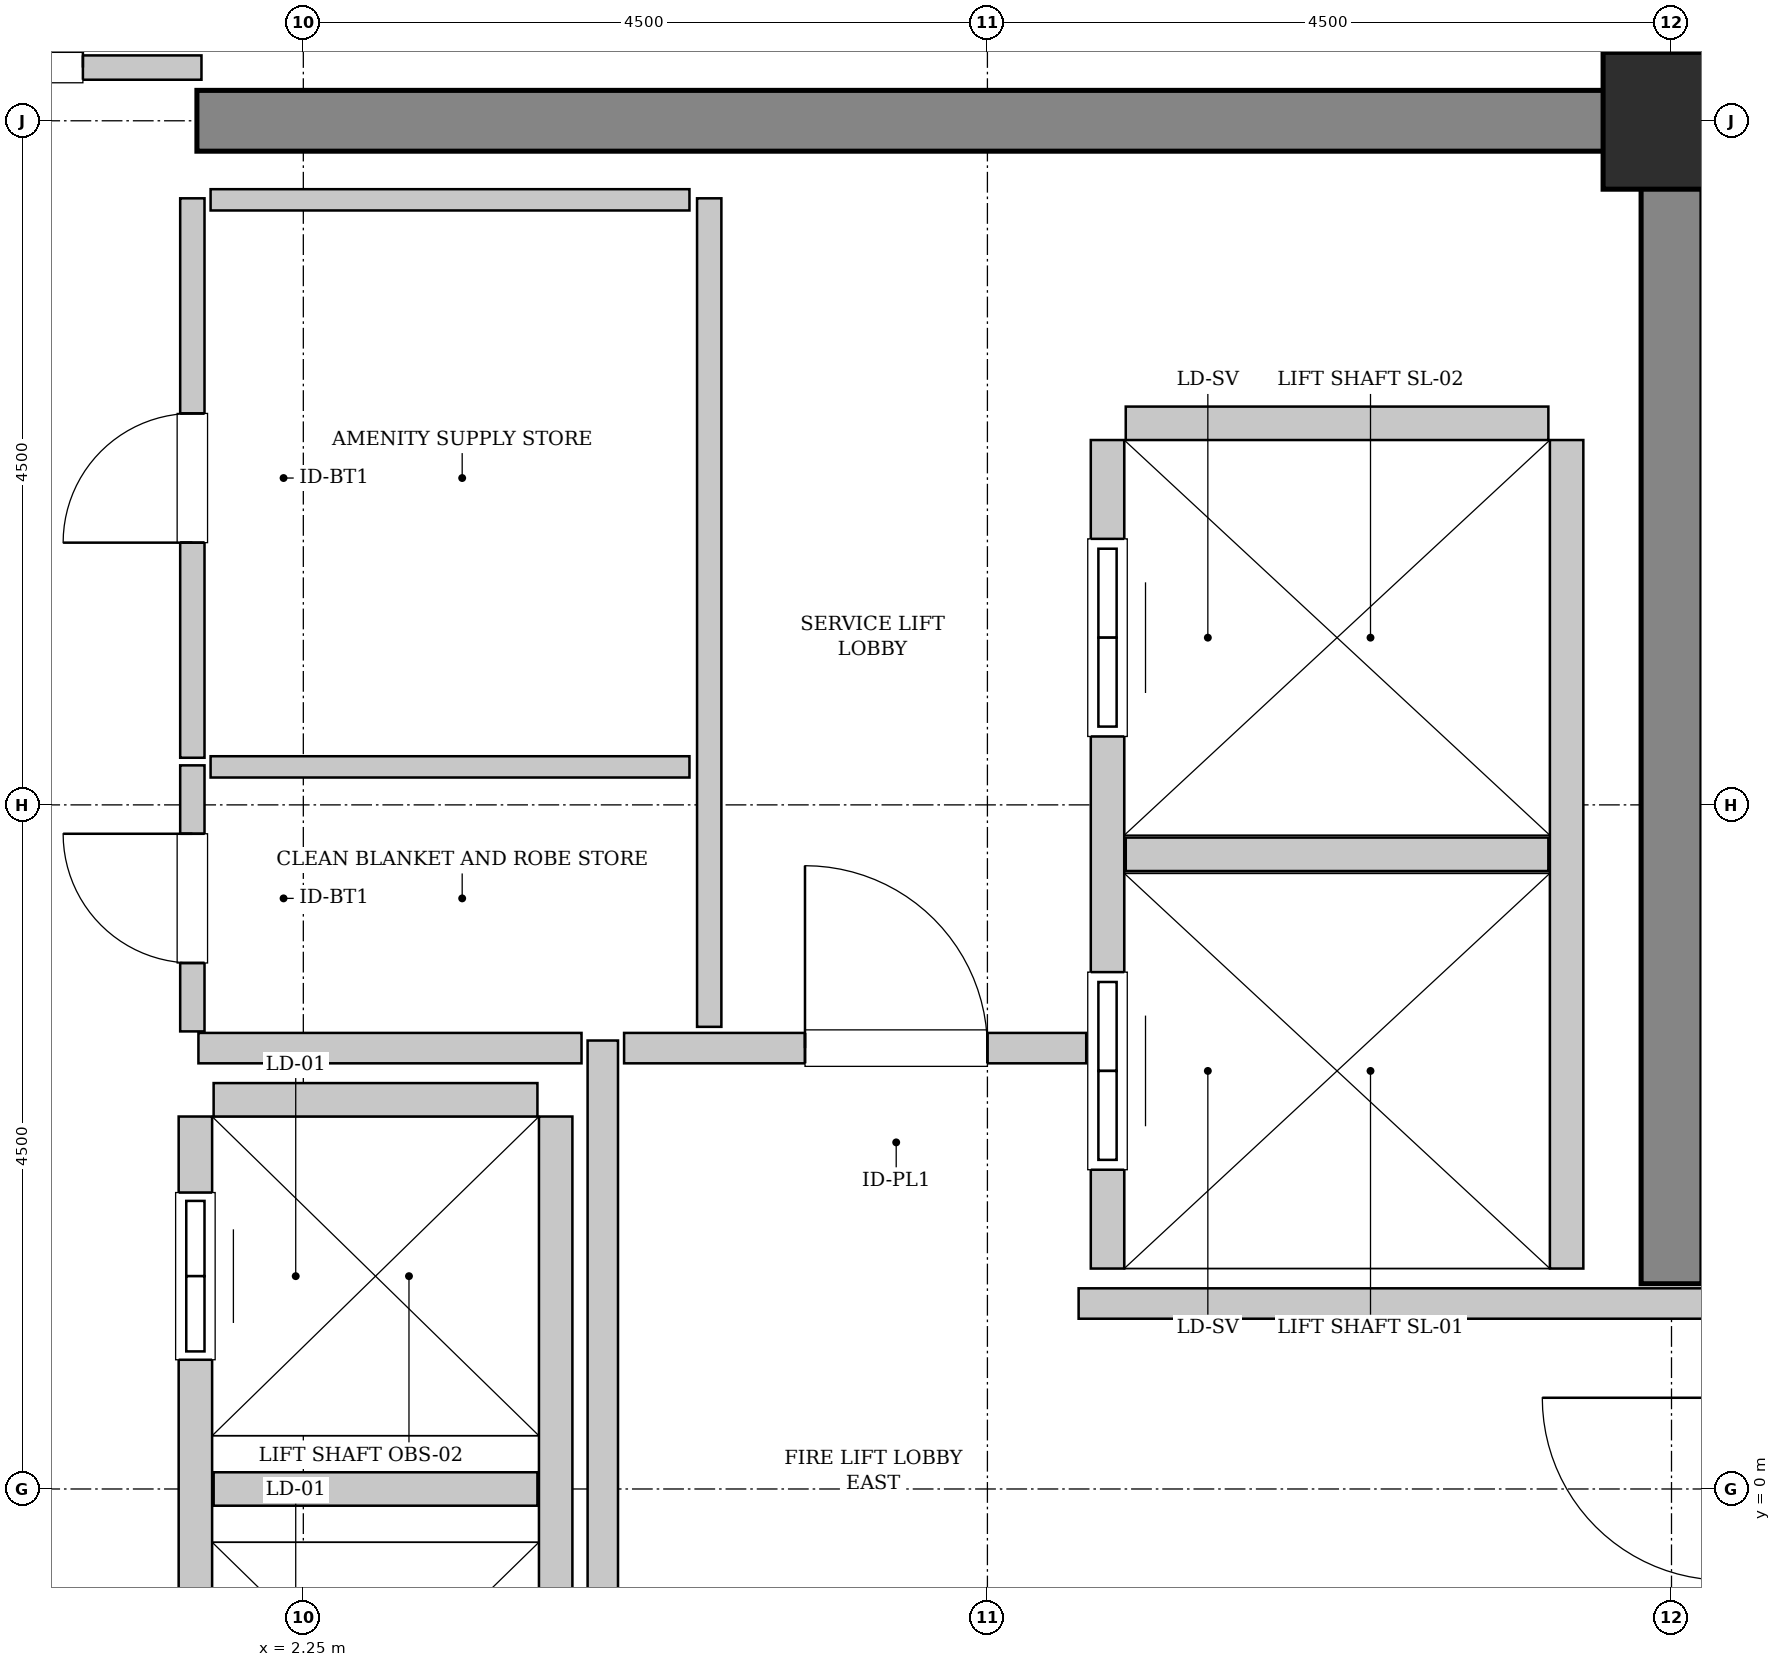
"""IFC4 building model, lengths in metres.
Left out: names, types, materials, properties, quantities, classifications, styles, units other than length and angle.
Written with IfcOpenShell. Run it as: python <this file> out.ifc"""

import sys

from ifc_helpers import new_model, si_unit, direction, frame, frame_2d, origin, origin_2d, place, context, subcontext, project, spatial, rectangle, extrude, source, transform, mapped, element, fill, save


model = new_model("IFC4")
c1 = context("Model", 3, precision=1e-05, world=origin(), true_north=direction((0.0, 1.0)))
c2 = subcontext(c1, "Body", "Model", "MODEL_VIEW")
j1 = project(units=[si_unit("LENGTHUNIT", "METRE"), si_unit("PLANEANGLEUNIT", "RADIAN")], contexts=[c1])
p1 = place(None, origin())
s1 = spatial("IfcSite", under=j1, at=p1, CompositionType="ELEMENT")
p2 = place(p1, origin())
s2 = spatial("IfcBuilding", under=s1, at=p2, CompositionType="ELEMENT")
p3 = place(p2, frame((0.0, 0.0, 349.0)))
s3 = spatial("IfcBuildingStorey", under=s2, at=p3, CompositionType="ELEMENT", Elevation=349.0)
m1 = source(origin(), c2, "Body", "SweptSolid", [
    extrude(rectangle(XDim=9.9, YDim=0.4, at=frame_2d((4.95, 0.0))), origin(), (0.0, 0.0, 1.0), 4.8),
])
p4 = place(p3, frame((1.55, 9.0, 0.0), z_axis=(0.0, 0.0, 1.0), x_axis=(1.0, 0.0, 0.0)))
e1 = element("IfcWall", 1, at=p4, inside=s3, PredefinedType="SHEAR", context=c2, shape_type="MappedRepresentation", body=[
    mapped(m1, transform((0.0, 0.0, 0.0), x_axis=(1.0, 0.0, 0.0), y_axis=(0.0, 1.0, 0.0), z_axis=(0.0, 0.0, 1.0), scale=1.0)),
])
m2 = source(origin(), c2, "Body", "SweptSolid", [
    extrude(rectangle(XDim=7.45, YDim=0.4, at=frame_2d((3.725, 0.0))), origin(), (0.0, 0.0, 1.0), 4.8),
])
p5 = place(p3, frame((11.25, 1.35, 0.0), z_axis=(0.0, 0.0, 1.0), x_axis=(0.0, 1.0, 0.0)))
e2 = element("IfcWall", 2, at=p5, inside=s3, PredefinedType="SHEAR", context=c2, shape_type="MappedRepresentation", body=[
    mapped(m2, transform((0.0, 0.0, 0.0), x_axis=(1.0, 0.0, 0.0), y_axis=(0.0, 1.0, 0.0), z_axis=(0.0, 0.0, 1.0), scale=1.0)),
])
m3 = source(origin(), c2, "Body", "SweptSolid", [
    extrude(rectangle(XDim=0.9, YDim=0.9, at=origin_2d()), origin(), (0.0, 0.0, 1.0), 4.8),
])
p6 = place(p3, frame((11.25, 9.0, 0.0), z_axis=(0.0, 0.0, 1.0), x_axis=(1.0, 0.0, 0.0)))
e3 = element("IfcColumn", 3, at=p6, inside=s3, PredefinedType="COLUMN", context=c2, shape_type="MappedRepresentation", body=[
    mapped(m3, transform((0.0, 0.0, 0.0), x_axis=(1.0, 0.0, 0.0), y_axis=(0.0, 1.0, 0.0), z_axis=(0.0, 0.0, 1.0), scale=1.0)),
])
m4 = source(origin(), c2, "Body", "SweptSolid", [
    extrude(rectangle(XDim=5.45, YDim=0.22, at=frame_2d((2.725, 0.0))), origin(), (0.0, 0.0, 1.0), 4.485),
])
p7 = place(p3, frame((7.54, 6.9, 0.0), z_axis=(0.0, 0.0, 1.0), x_axis=(0.0, -1.0, 0.0)))
e4 = element("IfcWall", 4, at=p7, inside=s3, PredefinedType="SOLIDWALL", context=c2, shape_type="MappedRepresentation", body=[
    mapped(m4, transform((0.0, 0.0, 0.0), x_axis=(1.0, 0.0, 0.0), y_axis=(0.0, 1.0, 0.0), z_axis=(0.0, 0.0, 1.0), scale=1.0)),
])
p8 = place(p7, frame((3.5, 0.0, 0.0)))
e5 = element("IfcOpeningElement", 5, at=p8, cuts=e4, PredefinedType="OPENING", context=c2, shape_type="SweptSolid", body=[
    extrude(rectangle(XDim=1.3, YDim=2.3, at=frame_2d((0.65, 1.15))), frame((0.0, 0.12, 0.0), z_axis=(0.0, -1.0, 0.0), x_axis=(1.0, 0.0, 0.0)), (0.0, 0.0, 1.0), 0.24),
])
p9 = place(p7, frame((0.65, 0.0, 0.0)))
e6 = element("IfcOpeningElement", 6, at=p9, cuts=e4, PredefinedType="OPENING", context=c2, shape_type="SweptSolid", body=[
    extrude(rectangle(XDim=1.3, YDim=2.3, at=frame_2d((0.65, 1.15))), frame((0.0, 0.12, 0.0), z_axis=(0.0, -1.0, 0.0), x_axis=(1.0, 0.0, 0.0)), (0.0, 0.0, 1.0), 0.24),
])
p10 = place(p3, frame((10.56, 1.45, 0.0), z_axis=(0.0, 0.0, 1.0), x_axis=(0.0, 1.0, 0.0)))
e7 = element("IfcWall", 7, at=p10, inside=s3, PredefinedType="SOLIDWALL", context=c2, shape_type="MappedRepresentation", body=[
    mapped(m4, transform((0.0, 0.0, 0.0), x_axis=(1.0, 0.0, 0.0), y_axis=(0.0, 1.0, 0.0), z_axis=(0.0, 0.0, 1.0), scale=1.0)),
])
m5 = source(origin(), c2, "Body", "SweptSolid", [
    extrude(rectangle(XDim=2.78, YDim=0.22, at=frame_2d((1.39, 0.0))), origin(), (0.0, 0.0, 1.0), 4.485),
])
for number, where, z_axis, x_axis in (
    (8, (7.66, 4.175, 0.0), (0.0, 0.0, 1.0), (1.0, 0.0, 0.0)),
    (9, (10.44, 7.01, 0.0), (0.0, 0.0, 1.0), (-1.0, 0.0, 0.0)),
):
    element("IfcWall", number, at=place(p3, frame(where, z_axis=z_axis, x_axis=x_axis)), inside=s3, PredefinedType="SOLIDWALL", context=c2, shape_type="MappedRepresentation", body=[
        mapped(m5, transform((0.0, 0.0, 0.0), x_axis=(1.0, 0.0, 0.0), y_axis=(0.0, 1.0, 0.0), z_axis=(0.0, 0.0, 1.0), scale=1.0)),
    ])
m6 = source(origin(), c2, "Body", "SweptSolid", [
    extrude(rectangle(XDim=4.9, YDim=0.22, at=frame_2d((2.45, 0.0))), origin(), (0.0, 0.0, 1.0), 4.485),
])
p11 = place(p3, frame((1.54, 2.45, 0.0), z_axis=(0.0, 0.0, 1.0), x_axis=(0.0, -1.0, 0.0)))
e10 = element("IfcWall", 10, at=p11, inside=s3, PredefinedType="SOLIDWALL", context=c2, shape_type="MappedRepresentation", body=[
    mapped(m6, transform((0.0, 0.0, 0.0), x_axis=(1.0, 0.0, 0.0), y_axis=(0.0, 1.0, 0.0), z_axis=(0.0, 0.0, 1.0), scale=1.0)),
])
p12 = place(p11, frame((3.3, 0.0, 0.0)))
e11 = element("IfcOpeningElement", 11, at=p12, cuts=e10, PredefinedType="OPENING", context=c2, shape_type="SweptSolid", body=[
    extrude(rectangle(XDim=1.1, YDim=2.2, at=frame_2d((0.55, 1.1))), frame((0.0, 0.12, 0.0), z_axis=(0.0, -1.0, 0.0), x_axis=(1.0, 0.0, 0.0)), (0.0, 0.0, 1.0), 0.24),
])
p13 = place(p11, frame((0.5, 0.0, 0.0)))
e12 = element("IfcOpeningElement", 12, at=p13, cuts=e10, PredefinedType="OPENING", context=c2, shape_type="SweptSolid", body=[
    extrude(rectangle(XDim=1.1, YDim=2.2, at=frame_2d((0.55, 1.1))), frame((0.0, 0.12, 0.0), z_axis=(0.0, -1.0, 0.0), x_axis=(1.0, 0.0, 0.0)), (0.0, 0.0, 1.0), 0.24),
])
p14 = place(p3, frame((3.91, -2.45, 0.0), z_axis=(0.0, 0.0, 1.0), x_axis=(0.0, 1.0, 0.0)))
e13 = element("IfcWall", 13, at=p14, inside=s3, PredefinedType="SOLIDWALL", context=c2, shape_type="MappedRepresentation", body=[
    mapped(m6, transform((0.0, 0.0, 0.0), x_axis=(1.0, 0.0, 0.0), y_axis=(0.0, 1.0, 0.0), z_axis=(0.0, 0.0, 1.0), scale=1.0)),
])
m7 = source(origin(), c2, "Body", "SweptSolid", [
    extrude(rectangle(XDim=2.13, YDim=0.22, at=frame_2d((1.065, 0.0))), origin(), (0.0, 0.0, 1.0), 4.485),
])
for number, where, z_axis, x_axis in (
    (14, (1.66, 0.0, 0.0), (0.0, 0.0, 1.0), (1.0, 0.0, 0.0)),
    (15, (3.79, 2.56, 0.0), (0.0, 0.0, 1.0), (-1.0, 0.0, 0.0)),
):
    element("IfcWall", number, at=place(p3, frame(where, z_axis=z_axis, x_axis=x_axis)), inside=s3, PredefinedType="SOLIDWALL", context=c2, shape_type="MappedRepresentation", body=[
        mapped(m7, transform((0.0, 0.0, 0.0), x_axis=(1.0, 0.0, 0.0), y_axis=(0.0, 1.0, 0.0), z_axis=(0.0, 0.0, 1.0), scale=1.0)),
    ])
m8 = source(origin(), c2, "Body", "SweptSolid", [
    extrude(rectangle(XDim=5.9, YDim=0.2, at=frame_2d((2.95, 0.0))), origin(), (0.0, 0.0, 1.0), 4.485),
])
p15 = place(p3, frame((4.22, -2.95, 0.0), z_axis=(0.0, 0.0, 1.0), x_axis=(0.0, 1.0, 0.0)))
e16 = element("IfcWall", 16, at=p15, inside=s3, PredefinedType="PARTITIONING", context=c2, shape_type="MappedRepresentation", body=[
    mapped(m8, transform((0.0, 0.0, 0.0), x_axis=(1.0, 0.0, 0.0), y_axis=(0.0, 1.0, 0.0), z_axis=(0.0, 0.0, 1.0), scale=1.0)),
])
m9 = source(origin(), c2, "Body", "SweptSolid", [
    extrude(rectangle(XDim=2.52, YDim=0.2, at=frame_2d((1.26, 0.0))), origin(), (0.0, 0.0, 1.0), 4.485),
])
p16 = place(p3, frame((1.56, 2.9, 0.0), z_axis=(0.0, 0.0, 1.0), x_axis=(1.0, 0.0, 0.0)))
e17 = element("IfcWall", 17, at=p16, inside=s3, PredefinedType="PARTITIONING", context=c2, shape_type="MappedRepresentation", body=[
    mapped(m9, transform((0.0, 0.0, 0.0), x_axis=(1.0, 0.0, 0.0), y_axis=(0.0, 1.0, 0.0), z_axis=(0.0, 0.0, 1.0), scale=1.0)),
])
m10 = source(origin(), c2, "Body", "SweptSolid", [
    extrude(rectangle(XDim=3.04, YDim=0.2, at=frame_2d((1.52, 0.0))), origin(), (0.0, 0.0, 1.0), 4.485),
])
p17 = place(p3, frame((4.36, 2.9, 0.0), z_axis=(0.0, 0.0, 1.0), x_axis=(1.0, 0.0, 0.0)))
e18 = element("IfcWall", 18, at=p17, inside=s3, PredefinedType="PARTITIONING", context=c2, shape_type="MappedRepresentation", body=[
    mapped(m10, transform((0.0, 0.0, 0.0), x_axis=(1.0, 0.0, 0.0), y_axis=(0.0, 1.0, 0.0), z_axis=(0.0, 0.0, 1.0), scale=1.0)),
])
p18 = place(p17, frame((1.19, 0.0, 0.0)))
e19 = element("IfcOpeningElement", 19, at=p18, cuts=e18, PredefinedType="OPENING", context=c2, shape_type="SweptSolid", body=[
    extrude(rectangle(XDim=1.2, YDim=2.15, at=frame_2d((0.6, 1.075))), frame((0.0, 0.11, 0.0), z_axis=(0.0, -1.0, 0.0), x_axis=(1.0, 0.0, 0.0)), (0.0, 0.0, 1.0), 0.22),
])
m11 = source(origin(), c2, "Body", "SweptSolid", [
    extrude(rectangle(XDim=4.11, YDim=0.2, at=frame_2d((2.055, 0.0))), origin(), (0.0, 0.0, 1.0), 4.485),
])
p19 = place(p3, frame((7.35, 1.22, 0.0), z_axis=(0.0, 0.0, 1.0), x_axis=(1.0, 0.0, 0.0)))
e20 = element("IfcWall", 20, at=p19, inside=s3, PredefinedType="PARTITIONING", context=c2, shape_type="MappedRepresentation", body=[
    mapped(m11, transform((0.0, 0.0, 0.0), x_axis=(1.0, 0.0, 0.0), y_axis=(0.0, 1.0, 0.0), z_axis=(0.0, 0.0, 1.0), scale=1.0)),
])
m12 = source(origin(), c2, "Body", "SweptSolid", [
    extrude(rectangle(XDim=3.16, YDim=0.16, at=frame_2d((1.58, 0.0))), origin(), (0.0, 0.0, 1.0), 3.575),
])
p20 = place(p3, frame((-1.58, 9.35, 0.0), z_axis=(0.0, 0.0, 1.0), x_axis=(1.0, 0.0, 0.0)))
e21 = element("IfcWall", 21, at=p20, inside=s3, PredefinedType="PARTITIONING", context=c2, shape_type="MappedRepresentation", body=[
    mapped(m12, transform((0.0, 0.0, 0.0), x_axis=(1.0, 0.0, 0.0), y_axis=(0.0, 1.0, 0.0), z_axis=(0.0, 0.0, 1.0), scale=1.0)),
])
p21 = place(p20, frame((0.78, 0.0, 0.0)))
e22 = element("IfcOpeningElement", 22, at=p21, cuts=e21, PredefinedType="OPENING", context=c2, shape_type="SweptSolid", body=[
    extrude(rectangle(XDim=1.6, YDim=2.3, at=frame_2d((0.8, 1.15))), frame((0.0, 0.09, 0.0), z_axis=(0.0, -1.0, 0.0), x_axis=(1.0, 0.0, 0.0)), (0.0, 0.0, 1.0), 0.18),
])
m13 = source(origin(), c2, "Body", "SweptSolid", [
    extrude(rectangle(XDim=5.45, YDim=0.16, at=frame_2d((2.725, 0.0))), origin(), (0.0, 0.0, 1.0), 4.485),
])
p22 = place(p3, frame((4.92, 3.04, 0.0), z_axis=(0.0, 0.0, 1.0), x_axis=(0.0, 1.0, 0.0)))
e23 = element("IfcWall", 23, at=p22, inside=s3, PredefinedType="PARTITIONING", context=c2, shape_type="MappedRepresentation", body=[
    mapped(m13, transform((0.0, 0.0, 0.0), x_axis=(1.0, 0.0, 0.0), y_axis=(0.0, 1.0, 0.0), z_axis=(0.0, 0.0, 1.0), scale=1.0)),
])
m14 = source(origin(), c2, "Body", "SweptSolid", [
    extrude(rectangle(XDim=1.75, YDim=0.16, at=frame_2d((0.875, 0.0))), origin(), (0.0, 0.0, 1.0), 4.485),
])
p23 = place(p3, frame((1.52, 3.01, 0.0), z_axis=(0.0, 0.0, 1.0), x_axis=(0.0, 1.0, 0.0)))
e24 = element("IfcWall", 24, at=p23, inside=s3, PredefinedType="PARTITIONING", context=c2, shape_type="MappedRepresentation", body=[
    mapped(m14, transform((0.0, 0.0, 0.0), x_axis=(1.0, 0.0, 0.0), y_axis=(0.0, 1.0, 0.0), z_axis=(0.0, 0.0, 1.0), scale=1.0)),
])
p24 = place(p23, frame((0.45, 0.0, 0.0)))
e25 = element("IfcOpeningElement", 25, at=p24, cuts=e24, PredefinedType="OPENING", context=c2, shape_type="SweptSolid", body=[
    extrude(rectangle(XDim=0.85, YDim=2.1, at=frame_2d((0.425, 1.05))), frame((0.0, 0.09, 0.0), z_axis=(0.0, -1.0, 0.0), x_axis=(1.0, 0.0, 0.0)), (0.0, 0.0, 1.0), 0.18),
])
m15 = source(origin(), c2, "Body", "SweptSolid", [
    extrude(rectangle(XDim=3.15, YDim=0.14, at=frame_2d((1.575, 0.0))), origin(), (0.0, 0.0, 1.0), 4.485),
])
p25 = place(p3, frame((1.64, 4.75, 0.0), z_axis=(0.0, 0.0, 1.0), x_axis=(1.0, 0.0, 0.0)))
e26 = element("IfcWall", 26, at=p25, inside=s3, PredefinedType="PARTITIONING", context=c2, shape_type="MappedRepresentation", body=[
    mapped(m15, transform((0.0, 0.0, 0.0), x_axis=(1.0, 0.0, 0.0), y_axis=(0.0, 1.0, 0.0), z_axis=(0.0, 0.0, 1.0), scale=1.0)),
])
m16 = source(origin(), c2, "Body", "SweptSolid", [
    extrude(rectangle(XDim=3.68, YDim=0.16, at=frame_2d((1.84, 0.0))), origin(), (0.0, 0.0, 1.0), 4.485),
])
p26 = place(p3, frame((1.52, 4.81, 0.0), z_axis=(0.0, 0.0, 1.0), x_axis=(0.0, 1.0, 0.0)))
e27 = element("IfcWall", 27, at=p26, inside=s3, PredefinedType="PARTITIONING", context=c2, shape_type="MappedRepresentation", body=[
    mapped(m16, transform((0.0, 0.0, 0.0), x_axis=(1.0, 0.0, 0.0), y_axis=(0.0, 1.0, 0.0), z_axis=(0.0, 0.0, 1.0), scale=1.0)),
])
p27 = place(p26, frame((1.415, 0.0, 0.0)))
e28 = element("IfcOpeningElement", 28, at=p27, cuts=e27, PredefinedType="OPENING", context=c2, shape_type="SweptSolid", body=[
    extrude(rectangle(XDim=0.85, YDim=2.1, at=frame_2d((0.425, 1.05))), frame((0.0, 0.09, 0.0), z_axis=(0.0, -1.0, 0.0), x_axis=(1.0, 0.0, 0.0)), (0.0, 0.0, 1.0), 0.18),
])
p28 = place(p3, frame((1.64, 8.48, 0.0), z_axis=(0.0, 0.0, 1.0), x_axis=(1.0, 0.0, 0.0)))
e29 = element("IfcWall", 29, at=p28, inside=s3, PredefinedType="PARTITIONING", context=c2, shape_type="MappedRepresentation", body=[
    mapped(m15, transform((0.0, 0.0, 0.0), x_axis=(1.0, 0.0, 0.0), y_axis=(0.0, 1.0, 0.0), z_axis=(0.0, 0.0, 1.0), scale=1.0)),
])
m17 = source(origin(), c2, "Body", "SweptSolid", [
    extrude(rectangle(XDim=1.3, YDim=2.3, at=frame_2d((0.65, 1.15))), frame((0.0, 0.025, 0.0), z_axis=(0.0, -1.0, 0.0), x_axis=(1.0, 0.0, 0.0)), (0.0, 0.0, 1.0), 0.05),
])
p29 = place(p8, origin())
e30 = element("IfcDoor", 30, at=p29, inside=s3, OperationType="SLIDING_TO_RIGHT", PredefinedType="DOOR", context=c2, shape_type="MappedRepresentation", body=[
    mapped(m17, transform((0.0, 0.0, 0.0), x_axis=(1.0, 0.0, 0.0), y_axis=(0.0, 1.0, 0.0), z_axis=(0.0, 0.0, 1.0), scale=1.0)),
])
fill(e5, e30)
p30 = place(p9, origin())
e31 = element("IfcDoor", 31, at=p30, inside=s3, OperationType="SLIDING_TO_RIGHT", PredefinedType="DOOR", context=c2, shape_type="MappedRepresentation", body=[
    mapped(m17, transform((0.0, 0.0, 0.0), x_axis=(1.0, 0.0, 0.0), y_axis=(0.0, 1.0, 0.0), z_axis=(0.0, 0.0, 1.0), scale=1.0)),
])
fill(e6, e31)
m18 = source(origin(), c2, "Body", "SweptSolid", [
    extrude(rectangle(XDim=1.1, YDim=2.2, at=frame_2d((0.55, 1.1))), frame((0.0, 0.025, 0.0), z_axis=(0.0, -1.0, 0.0), x_axis=(1.0, 0.0, 0.0)), (0.0, 0.0, 1.0), 0.05),
])
p31 = place(p13, origin())
e32 = element("IfcDoor", 32, at=p31, inside=s3, OperationType="DOUBLE_DOOR_SLIDING", PredefinedType="DOOR", context=c2, shape_type="MappedRepresentation", body=[
    mapped(m18, transform((0.0, 0.0, 0.0), x_axis=(1.0, 0.0, 0.0), y_axis=(0.0, 1.0, 0.0), z_axis=(0.0, 0.0, 1.0), scale=1.0)),
])
fill(e12, e32)
m19 = source(origin(), c2, "Body", "SweptSolid", [
    extrude(rectangle(XDim=1.2, YDim=2.15, at=frame_2d((0.6, 1.075))), frame((0.0, 0.025, 0.0), z_axis=(0.0, -1.0, 0.0), x_axis=(1.0, 0.0, 0.0)), (0.0, 0.0, 1.0), 0.05),
])
p32 = place(p18, origin())
e33 = element("IfcDoor", 33, at=p32, inside=s3, OperationType="SINGLE_SWING_LEFT", PredefinedType="DOOR", context=c2, shape_type="MappedRepresentation", body=[
    mapped(m19, transform((0.0, 0.0, 0.0), x_axis=(1.0, 0.0, 0.0), y_axis=(0.0, 1.0, 0.0), z_axis=(0.0, 0.0, 1.0), scale=1.0)),
])
fill(e19, e33)
m20 = source(origin(), c2, "Body", "SweptSolid", [
    extrude(rectangle(XDim=1.6, YDim=2.3, at=frame_2d((0.8, 1.15))), frame((0.0, 0.025, 0.0), z_axis=(0.0, -1.0, 0.0), x_axis=(1.0, 0.0, 0.0)), (0.0, 0.0, 1.0), 0.05),
])
p33 = place(p21, origin())
e34 = element("IfcDoor", 34, at=p33, inside=s3, OperationType="DOUBLE_DOOR_SINGLE_SWING", PredefinedType="DOOR", context=c2, shape_type="MappedRepresentation", body=[
    mapped(m20, transform((0.0, 0.0, 0.0), x_axis=(1.0, 0.0, 0.0), y_axis=(0.0, 1.0, 0.0), z_axis=(0.0, 0.0, 1.0), scale=1.0)),
])
fill(e22, e34)
m21 = source(origin(), c2, "Body", "SweptSolid", [
    extrude(rectangle(XDim=0.85, YDim=2.1, at=frame_2d((0.425, 1.05))), frame((0.0, 0.025, 0.0), z_axis=(0.0, -1.0, 0.0), x_axis=(1.0, 0.0, 0.0)), (0.0, 0.0, 1.0), 0.05),
])
p34 = place(p24, origin())
e35 = element("IfcDoor", 35, at=p34, inside=s3, OperationType="SINGLE_SWING_RIGHT", PredefinedType="DOOR", context=c2, shape_type="MappedRepresentation", body=[
    mapped(m21, transform((0.0, 0.0, 0.0), x_axis=(1.0, 0.0, 0.0), y_axis=(0.0, 1.0, 0.0), z_axis=(0.0, 0.0, 1.0), scale=1.0)),
])
fill(e25, e35)
p35 = place(p27, origin())
e36 = element("IfcDoor", 36, at=p35, inside=s3, OperationType="SINGLE_SWING_LEFT", PredefinedType="DOOR", context=c2, shape_type="MappedRepresentation", body=[
    mapped(m21, transform((0.0, 0.0, 0.0), x_axis=(1.0, 0.0, 0.0), y_axis=(0.0, 1.0, 0.0), z_axis=(0.0, 0.0, 1.0), scale=1.0)),
])
fill(e28, e36)
save(model, sys.argv[1])
